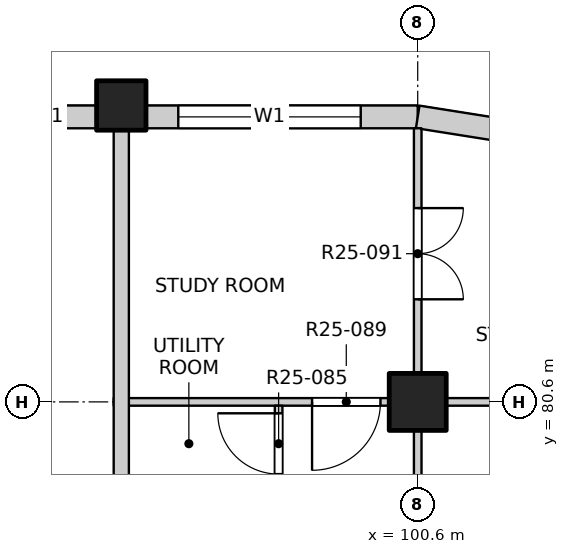
"""IFC4 building model, lengths in metres.
Left out: names, types, materials, properties, quantities, classifications, styles, units other than length and angle.
Written with IfcOpenShell. Run it as: python <this file> out.ifc"""

import sys

from ifc_helpers import new_model, si_unit, direction, frame, frame_2d, origin, origin_2d, place, context, subcontext, project, spatial, rectangle, extrude, element, fill, save


model = new_model("IFC4")
c1 = context("Model", 3, precision=1e-05, world=origin(), true_north=direction((0.0, 1.0)))
c2 = subcontext(c1, "Body", "Model", "MODEL_VIEW")
j1 = project(units=[si_unit("LENGTHUNIT", "METRE"), si_unit("PLANEANGLEUNIT", "RADIAN")], contexts=[c1])
p1 = place(None, origin())
s1 = spatial("IfcSite", under=j1, at=p1, CompositionType="ELEMENT")
p2 = place(p1, origin())
s2 = spatial("IfcBuilding", under=s1, at=p2, CompositionType="ELEMENT")
p3 = place(p2, frame((0.0, 0.0, 252.8)))
s3 = spatial("IfcBuildingStorey", under=s2, at=p3, CompositionType="ELEMENT", Elevation=252.8)
p4 = place(p3, frame((96.7, 84.5, -0.25), z_axis=(0.0, 0.0, 1.0), x_axis=(1.0, 0.0, 0.0)))
e1 = element("IfcColumn", 1, at=p4, inside=s3, PredefinedType="COLUMN", context=c2, shape_type="SweptSolid", body=[
    extrude(rectangle(XDim=0.65, YDim=0.65, at=origin_2d()), origin(), (0.0, 0.0, 1.0), 3.4),
])
p5 = place(p3, frame((100.6, 80.6, -0.25), z_axis=(0.0, 0.0, 1.0), x_axis=(1.0, 0.0, 0.0)))
e2 = element("IfcColumn", 2, at=p5, inside=s3, PredefinedType="COLUMN", context=c2, shape_type="SweptSolid", body=[
    extrude(rectangle(XDim=0.75, YDim=0.75, at=origin_2d()), origin(), (0.0, 0.0, 1.0), 3.4),
])
p6 = place(p3, frame((94.95, 84.35, 0.0), z_axis=(0.0, 0.0, 1.0), x_axis=(1.0, 0.0, 0.0)))
e3 = element("IfcWall", 3, at=p6, inside=s3, PredefinedType="SOLIDWALL", context=c2, shape_type="SweptSolid", body=[
    extrude(rectangle(XDim=1.425, YDim=0.3, at=frame_2d((0.712, 0.0))), origin(), (0.0, 0.0, 1.0), 2.7),
])
p7 = place(p3, frame((97.025, 84.35, 0.0), z_axis=(0.0, 0.0, 1.0), x_axis=(1.0, 0.0, 0.0)))
e4 = element("IfcWall", 4, at=p7, inside=s3, PredefinedType="SOLIDWALL", context=c2, shape_type="SweptSolid", body=[
    extrude(rectangle(XDim=3.575, YDim=0.3, at=frame_2d((1.788, 0.0))), origin(), (0.0, 0.0, 1.0), 2.7),
])
p8 = place(p7, frame((0.425, 0.0, 0.9)))
e5 = element("IfcOpeningElement", 5, at=p8, cuts=e4, PredefinedType="OPENING", context=c2, shape_type="SweptSolid", body=[
    extrude(rectangle(XDim=2.4, YDim=1.8, at=frame_2d((1.2, 0.9))), frame((0.0, 0.16, 0.0), z_axis=(0.0, -1.0, 0.0), x_axis=(1.0, 0.0, 0.0)), (0.0, 0.0, 1.0), 0.32),
])
p9 = place(p3, frame((101.759, 84.167, 0.0), z_axis=(0.0, 0.0, 1.0), x_axis=(-0.987678452879, 0.156496880861, 0.0)))
e6 = element("IfcWall", 6, at=p9, inside=s3, PredefinedType="SOLIDWALL", context=c2, shape_type="SweptSolid", body=[
    extrude(rectangle(XDim=1.173, YDim=0.3, at=frame_2d((0.586, 0.0))), origin(), (0.0, 0.0, 1.0), 2.7),
])
p10 = place(p3, frame((96.6, 80.6, 0.0), z_axis=(0.0, 0.0, 1.0), x_axis=(1.0, 0.0, 0.0)))
e7 = element("IfcWall", 7, at=p10, inside=s3, PredefinedType="PARTITIONING", context=c2, shape_type="SweptSolid", body=[
    extrude(rectangle(XDim=7.6, YDim=0.1, at=frame_2d((3.8, 0.0))), origin(), (0.0, 0.0, 1.0), 3.15),
])
p11 = place(p10, frame((2.61, 0.0, 0.0)))
e8 = element("IfcOpeningElement", 8, at=p11, cuts=e7, PredefinedType="OPENING", context=c2, shape_type="SweptSolid", body=[
    extrude(rectangle(XDim=0.9, YDim=2.1, at=frame_2d((0.45, 1.05))), frame((0.0, 0.06, 0.0), z_axis=(0.0, -1.0, 0.0), x_axis=(1.0, 0.0, 0.0)), (0.0, 0.0, 1.0), 0.12),
])
p12 = place(p3, frame((96.7, 49.5, 0.0), z_axis=(0.0, 0.0, 1.0), x_axis=(0.0, 1.0, 0.0)))
e9 = element("IfcWall", 9, at=p12, inside=s3, PredefinedType="PARTITIONING", context=c2, shape_type="SweptSolid", body=[
    extrude(rectangle(XDim=34.7, YDim=0.2, at=frame_2d((17.35, 0.0))), origin(), (0.0, 0.0, 1.0), 3.15),
])
p13 = place(p12, frame((6.575, 0.0, 0.0)))
e10 = element("IfcOpeningElement", 10, at=p13, cuts=e9, PredefinedType="OPENING", context=c2, shape_type="SweptSolid", body=[
    extrude(rectangle(XDim=1.0, YDim=2.1, at=frame_2d((0.5, 1.05))), frame((0.0, 0.11, 0.0), z_axis=(0.0, -1.0, 0.0), x_axis=(1.0, 0.0, 0.0)), (0.0, 0.0, 1.0), 0.22),
])
p14 = place(p12, frame((13.975, 0.0, 0.0)))
e11 = element("IfcOpeningElement", 11, at=p14, cuts=e9, PredefinedType="OPENING", context=c2, shape_type="SweptSolid", body=[
    extrude(rectangle(XDim=1.0, YDim=2.1, at=frame_2d((0.5, 1.05))), frame((0.0, 0.11, 0.0), z_axis=(0.0, -1.0, 0.0), x_axis=(1.0, 0.0, 0.0)), (0.0, 0.0, 1.0), 0.22),
])
p15 = place(p12, frame((26.525, 0.0, 0.0)))
e12 = element("IfcOpeningElement", 12, at=p15, cuts=e9, PredefinedType="OPENING", context=c2, shape_type="SweptSolid", body=[
    extrude(rectangle(XDim=1.0, YDim=2.1, at=frame_2d((0.5, 1.05))), frame((0.0, 0.11, 0.0), z_axis=(0.0, -1.0, 0.0), x_axis=(1.0, 0.0, 0.0)), (0.0, 0.0, 1.0), 0.22),
])
p16 = place(p3, frame((98.77, 78.35, 0.0), z_axis=(0.0, 0.0, 1.0), x_axis=(0.0, 1.0, 0.0)))
e13 = element("IfcWall", 13, at=p16, inside=s3, PredefinedType="PARTITIONING", context=c2, shape_type="SweptSolid", body=[
    extrude(rectangle(XDim=2.2, YDim=0.1, at=frame_2d((1.1, 0.0))), origin(), (0.0, 0.0, 1.0), 3.15),
])
p17 = place(p16, frame((0.1, 0.0, 0.0)))
e14 = element("IfcOpeningElement", 14, at=p17, cuts=e13, PredefinedType="OPENING", context=c2, shape_type="SweptSolid", body=[
    extrude(rectangle(XDim=0.9, YDim=2.1, at=frame_2d((0.45, 1.05))), frame((0.0, 0.06, 0.0), z_axis=(0.0, -1.0, 0.0), x_axis=(1.0, 0.0, 0.0)), (0.0, 0.0, 1.0), 0.12),
])
p18 = place(p16, frame((1.3, 0.0, 0.0)))
e15 = element("IfcOpeningElement", 15, at=p18, cuts=e13, PredefinedType="OPENING", context=c2, shape_type="SweptSolid", body=[
    extrude(rectangle(XDim=0.8, YDim=2.1, at=frame_2d((0.4, 1.05))), frame((0.0, 0.06, 0.0), z_axis=(0.0, -1.0, 0.0), x_axis=(1.0, 0.0, 0.0)), (0.0, 0.0, 1.0), 0.12),
])
p19 = place(p3, frame((100.6, 45.8, 0.0), z_axis=(0.0, 0.0, 1.0), x_axis=(0.0, 1.0, 0.0)))
e16 = element("IfcWall", 16, at=p19, inside=s3, PredefinedType="PARTITIONING", context=c2, shape_type="SweptSolid", body=[
    extrude(rectangle(XDim=38.4, YDim=0.1, at=frame_2d((19.2, 0.0))), origin(), (0.0, 0.0, 1.0), 3.15),
])
p20 = place(p19, frame((1.05, 0.0, 0.0)))
e17 = element("IfcOpeningElement", 17, at=p20, cuts=e16, PredefinedType="OPENING", context=c2, shape_type="SweptSolid", body=[
    extrude(rectangle(XDim=1.2, YDim=2.1, at=frame_2d((0.6, 1.05))), frame((0.0, 0.06, 0.0), z_axis=(0.0, -1.0, 0.0), x_axis=(1.0, 0.0, 0.0)), (0.0, 0.0, 1.0), 0.12),
])
p21 = place(p19, frame((5.1, 0.0, 0.0)))
e18 = element("IfcOpeningElement", 18, at=p21, cuts=e16, PredefinedType="OPENING", context=c2, shape_type="SweptSolid", body=[
    extrude(rectangle(XDim=0.9, YDim=2.1, at=frame_2d((0.45, 1.05))), frame((0.0, 0.06, 0.0), z_axis=(0.0, -1.0, 0.0), x_axis=(1.0, 0.0, 0.0)), (0.0, 0.0, 1.0), 0.12),
])
p22 = place(p19, frame((9.0, 0.0, 0.0)))
e19 = element("IfcOpeningElement", 19, at=p22, cuts=e16, PredefinedType="OPENING", context=c2, shape_type="SweptSolid", body=[
    extrude(rectangle(XDim=0.9, YDim=2.1, at=frame_2d((0.45, 1.05))), frame((0.0, 0.06, 0.0), z_axis=(0.0, -1.0, 0.0), x_axis=(1.0, 0.0, 0.0)), (0.0, 0.0, 1.0), 0.12),
])
p23 = place(p19, frame((12.9, 0.0, 0.0)))
e20 = element("IfcOpeningElement", 20, at=p23, cuts=e16, PredefinedType="OPENING", context=c2, shape_type="SweptSolid", body=[
    extrude(rectangle(XDim=0.9, YDim=2.1, at=frame_2d((0.45, 1.05))), frame((0.0, 0.06, 0.0), z_axis=(0.0, -1.0, 0.0), x_axis=(1.0, 0.0, 0.0)), (0.0, 0.0, 1.0), 0.12),
])
p24 = place(p19, frame((16.8, 0.0, 0.0)))
e21 = element("IfcOpeningElement", 21, at=p24, cuts=e16, PredefinedType="OPENING", context=c2, shape_type="SweptSolid", body=[
    extrude(rectangle(XDim=0.9, YDim=2.1, at=frame_2d((0.45, 1.05))), frame((0.0, 0.06, 0.0), z_axis=(0.0, -1.0, 0.0), x_axis=(1.0, 0.0, 0.0)), (0.0, 0.0, 1.0), 0.12),
])
p25 = place(p19, frame((20.7, 0.0, 0.0)))
e22 = element("IfcOpeningElement", 22, at=p25, cuts=e16, PredefinedType="OPENING", context=c2, shape_type="SweptSolid", body=[
    extrude(rectangle(XDim=0.9, YDim=2.1, at=frame_2d((0.45, 1.05))), frame((0.0, 0.06, 0.0), z_axis=(0.0, -1.0, 0.0), x_axis=(1.0, 0.0, 0.0)), (0.0, 0.0, 1.0), 0.12),
])
p26 = place(p19, frame((24.6, 0.0, 0.0)))
e23 = element("IfcOpeningElement", 23, at=p26, cuts=e16, PredefinedType="OPENING", context=c2, shape_type="SweptSolid", body=[
    extrude(rectangle(XDim=0.9, YDim=2.1, at=frame_2d((0.45, 1.05))), frame((0.0, 0.06, 0.0), z_axis=(0.0, -1.0, 0.0), x_axis=(1.0, 0.0, 0.0)), (0.0, 0.0, 1.0), 0.12),
])
p27 = place(p19, frame((28.5, 0.0, 0.0)))
e24 = element("IfcOpeningElement", 24, at=p27, cuts=e16, PredefinedType="OPENING", context=c2, shape_type="SweptSolid", body=[
    extrude(rectangle(XDim=0.9, YDim=2.1, at=frame_2d((0.45, 1.05))), frame((0.0, 0.06, 0.0), z_axis=(0.0, -1.0, 0.0), x_axis=(1.0, 0.0, 0.0)), (0.0, 0.0, 1.0), 0.12),
])
p28 = place(p19, frame((32.4, 0.0, 0.0)))
e25 = element("IfcOpeningElement", 25, at=p28, cuts=e16, PredefinedType="OPENING", context=c2, shape_type="SweptSolid", body=[
    extrude(rectangle(XDim=0.9, YDim=2.1, at=frame_2d((0.45, 1.05))), frame((0.0, 0.06, 0.0), z_axis=(0.0, -1.0, 0.0), x_axis=(1.0, 0.0, 0.0)), (0.0, 0.0, 1.0), 0.12),
])
p29 = place(p19, frame((36.15, 0.0, 0.0)))
e26 = element("IfcOpeningElement", 26, at=p29, cuts=e16, PredefinedType="OPENING", context=c2, shape_type="SweptSolid", body=[
    extrude(rectangle(XDim=1.2, YDim=2.1, at=frame_2d((0.6, 1.05))), frame((0.0, 0.06, 0.0), z_axis=(0.0, -1.0, 0.0), x_axis=(1.0, 0.0, 0.0)), (0.0, 0.0, 1.0), 0.12),
])
p30 = place(p8, origin())
e27 = element("IfcWindow", 27, at=p30, inside=s3, PartitioningType="DOUBLE_PANEL_VERTICAL", PredefinedType="WINDOW", context=c2, shape_type="SweptSolid", body=[
    extrude(rectangle(XDim=2.4, YDim=1.8, at=frame_2d((1.2, 0.9))), frame((0.0, 0.03, 0.0), z_axis=(0.0, -1.0, 0.0), x_axis=(1.0, 0.0, 0.0)), (0.0, 0.0, 1.0), 0.06),
])
fill(e5, e27)
p31 = place(p18, origin())
e28 = element("IfcDoor", 28, at=p31, inside=s3, OperationType="SINGLE_SWING_RIGHT", PredefinedType="DOOR", context=c2, shape_type="SweptSolid", body=[
    extrude(rectangle(XDim=0.8, YDim=2.1, at=frame_2d((0.4, 1.05))), frame((0.0, 0.025, 0.0), z_axis=(0.0, -1.0, 0.0), x_axis=(1.0, 0.0, 0.0)), (0.0, 0.0, 1.0), 0.05),
])
fill(e15, e28)
p32 = place(p11, origin())
e29 = element("IfcDoor", 29, at=p32, inside=s3, OperationType="SINGLE_SWING_RIGHT", PredefinedType="DOOR", context=c2, shape_type="SweptSolid", body=[
    extrude(rectangle(XDim=0.9, YDim=2.1, at=frame_2d((0.45, 1.05))), frame((0.0, 0.025, 0.0), z_axis=(0.0, -1.0, 0.0), x_axis=(1.0, 0.0, 0.0)), (0.0, 0.0, 1.0), 0.05),
])
fill(e8, e29)
p33 = place(p29, origin())
e30 = element("IfcDoor", 30, at=p33, inside=s3, OperationType="DOUBLE_DOOR_SINGLE_SWING", PredefinedType="DOOR", context=c2, shape_type="SweptSolid", body=[
    extrude(rectangle(XDim=1.2, YDim=2.1, at=frame_2d((0.6, 1.05))), frame((0.0, 0.025, 0.0), z_axis=(0.0, -1.0, 0.0), x_axis=(1.0, 0.0, 0.0)), (0.0, 0.0, 1.0), 0.05),
])
fill(e26, e30)
save(model, sys.argv[1])
